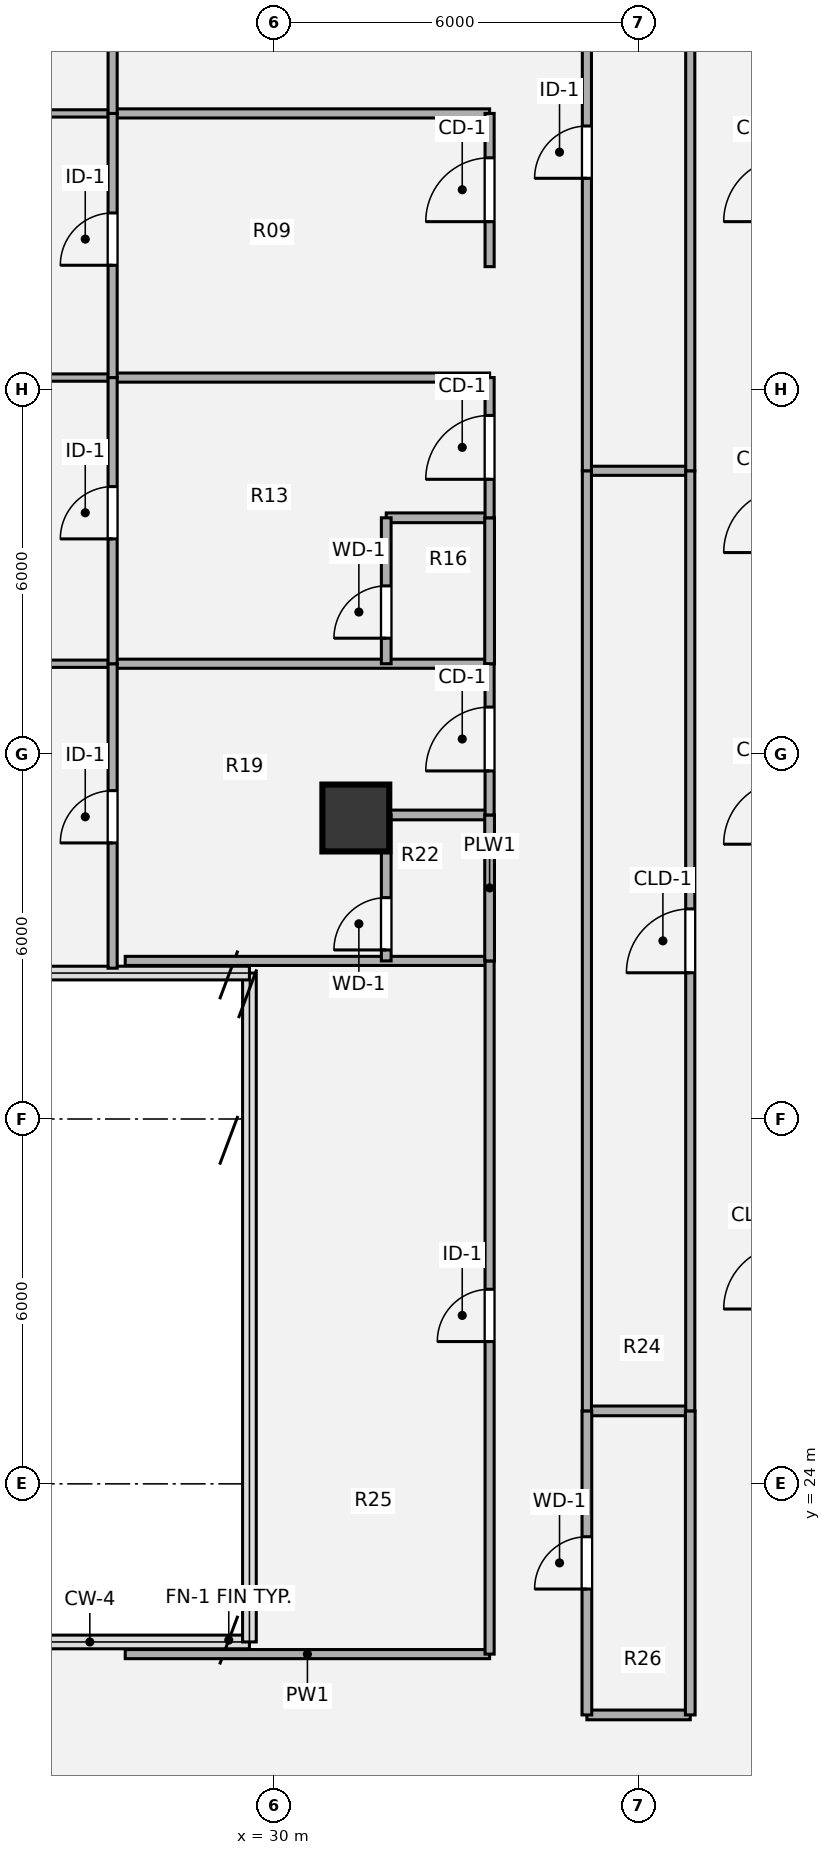
"""IFC4 building model, lengths in metres.
Left out: names, types, materials, properties, quantities, classifications, styles, units other than length and angle.
Written with IfcOpenShell. Run it as: python <this file> out.ifc"""

import sys

from ifc_helpers import new_model, si_unit, direction, frame, frame_2d, origin, origin_2d, place, context, subcontext, project, spatial, rectangle, hollow_circle, extrude, source, transform, mapped, element, fill, save


model = new_model("IFC4")
c1 = context("Model", 3, precision=1e-05, world=origin(), true_north=direction((0.0, 1.0)))
c2 = subcontext(c1, "Body", "Model", "MODEL_VIEW")
j1 = project(units=[si_unit("LENGTHUNIT", "METRE"), si_unit("PLANEANGLEUNIT", "RADIAN")], contexts=[c1])
p1 = place(None, origin())
s1 = spatial("IfcSite", under=j1, at=p1, CompositionType="ELEMENT")
p2 = place(p1, origin())
s2 = spatial("IfcBuilding", under=s1, at=p2, CompositionType="ELEMENT")
p3 = place(p2, frame((0.0, 0.0, 201.78)))
s3 = spatial("IfcBuildingStorey", under=s2, at=p3, CompositionType="ELEMENT", Elevation=201.78)
m1 = source(origin(), c2, "Body", "SweptSolid", [
    extrude(hollow_circle(Radius=0.55, WallThickness=0.04, at=origin_2d()), origin(), (0.0, 0.0, 1.0), 3.78),
])
p4 = place(p3, frame((31.35, 34.95, 0.0), z_axis=(0.0, 0.0, 1.0), x_axis=(1.0, 0.0, 0.0)))
e1 = element("IfcColumn", 1, at=p4, inside=s3, PredefinedType="COLUMN", context=c2, shape_type="MappedRepresentation", body=[
    mapped(m1, transform((0.0, 0.0, 0.0), x_axis=(1.0, 0.0, 0.0), y_axis=(0.0, 1.0, 0.0), z_axis=(0.0, 0.0, 1.0), scale=1.0)),
])
p5 = place(p3, frame((35.15, 20.2, 0.0), z_axis=(0.0, 0.0, 1.0), x_axis=(1.0, 0.0, 0.0)))
e2 = element("IfcWall", 2, at=p5, inside=s3, PredefinedType="PLUMBINGWALL", context=c2, shape_type="SweptSolid", body=[
    extrude(rectangle(XDim=1.7, YDim=0.16, at=frame_2d((0.85, 0.0))), origin(), (0.0, 0.0, 1.0), 3.5),
])
p6 = place(p3, frame((27.558, 21.2, 0.0), z_axis=(0.0, 0.0, 1.0), x_axis=(1.0, 0.0, 0.0)))
e3 = element("IfcWall", 3, at=p6, inside=s3, PredefinedType="PARTITIONING", context=c2, shape_type="SweptSolid", body=[
    extrude(rectangle(XDim=5.992, YDim=0.15, at=frame_2d((2.996, 0.0))), origin(), (0.0, 0.0, 1.0), 3.5),
])
p7 = place(p3, frame((35.15, 25.2, 0.0), z_axis=(0.0, 0.0, 1.0), x_axis=(1.0, 0.0, 0.0)))
e4 = element("IfcWall", 4, at=p7, inside=s3, PredefinedType="PLUMBINGWALL", context=c2, shape_type="SweptSolid", body=[
    extrude(rectangle(XDim=1.7, YDim=0.16, at=frame_2d((0.85, 0.0))), origin(), (0.0, 0.0, 1.0), 3.5),
])
p8 = place(p3, frame((27.557, 32.6, 0.0), z_axis=(0.0, 0.0, 1.0), x_axis=(1.0, 0.0, 0.0)))
e5 = element("IfcWall", 5, at=p8, inside=s3, PredefinedType="PARTITIONING", context=c2, shape_type="SweptSolid", body=[
    extrude(rectangle(XDim=5.993, YDim=0.15, at=frame_2d((2.997, 0.0))), origin(), (0.0, 0.0, 1.0), 3.5),
])
p9 = place(p3, frame((31.85, 35.0, 0.0), z_axis=(0.0, 0.0, 1.0), x_axis=(1.0, 0.0, 0.0)))
e6 = element("IfcWall", 6, at=p9, inside=s3, PredefinedType="PLUMBINGWALL", context=c2, shape_type="SweptSolid", body=[
    extrude(rectangle(XDim=1.7, YDim=0.16, at=frame_2d((0.85, 0.0))), origin(), (0.0, 0.0, 1.0), 2.903),
])
p10 = place(p3, frame((15.88, 37.487, 0.0), z_axis=(0.0, 0.0, 1.0), x_axis=(1.0, 0.0, 0.0)))
e7 = element("IfcWall", 7, at=p10, inside=s3, PredefinedType="PARTITIONING", context=c2, shape_type="SweptSolid", body=[
    extrude(rectangle(XDim=11.47, YDim=0.12, at=frame_2d((5.735, 0.0))), origin(), (0.0, 0.0, 1.0), 3.055),
])
p11 = place(p3, frame((27.35, 37.487, 0.0), z_axis=(0.0, 0.0, 1.0), x_axis=(1.0, 0.0, 0.0)))
e8 = element("IfcWall", 8, at=p11, inside=s3, PredefinedType="PARTITIONING", context=c2, shape_type="SweptSolid", body=[
    extrude(rectangle(XDim=6.2, YDim=0.15, at=frame_2d((3.1, 0.0))), origin(), (0.0, 0.0, 1.0), 3.055),
])
p12 = place(p3, frame((31.85, 39.887, 0.0), z_axis=(0.0, 0.0, 1.0), x_axis=(1.0, 0.0, 0.0)))
e9 = element("IfcWall", 9, at=p12, inside=s3, PredefinedType="PLUMBINGWALL", context=c2, shape_type="SweptSolid", body=[
    extrude(rectangle(XDim=1.7, YDim=0.16, at=frame_2d((0.85, 0.0))), origin(), (0.0, 0.0, 1.0), 3.259),
])
p13 = place(p3, frame((35.15, 40.66, 0.0), z_axis=(0.0, 0.0, 1.0), x_axis=(1.0, 0.0, 0.0)))
e10 = element("IfcWall", 10, at=p13, inside=s3, PredefinedType="PARTITIONING", context=c2, shape_type="SweptSolid", body=[
    extrude(rectangle(XDim=1.7, YDim=0.15, at=frame_2d((0.85, 0.0))), origin(), (0.0, 0.0, 1.0), 3.259),
])
p14 = place(p3, frame((15.88, 42.193, 0.0), z_axis=(0.0, 0.0, 1.0), x_axis=(1.0, 0.0, 0.0)))
e11 = element("IfcWall", 11, at=p14, inside=s3, PredefinedType="PARTITIONING", context=c2, shape_type="SweptSolid", body=[
    extrude(rectangle(XDim=11.47, YDim=0.12, at=frame_2d((5.735, 0.0))), origin(), (0.0, 0.0, 1.0), 2.982),
])
p15 = place(p3, frame((27.35, 42.193, 0.0), z_axis=(0.0, 0.0, 1.0), x_axis=(1.0, 0.0, 0.0)))
e12 = element("IfcWall", 12, at=p15, inside=s3, PredefinedType="PARTITIONING", context=c2, shape_type="SweptSolid", body=[
    extrude(rectangle(XDim=6.2, YDim=0.15, at=frame_2d((3.1, 0.0))), origin(), (0.0, 0.0, 1.0), 2.982),
])
p16 = place(p3, frame((15.88, 46.537, 0.0), z_axis=(0.0, 0.0, 1.0), x_axis=(1.0, 0.0, 0.0)))
e13 = element("IfcWall", 13, at=p16, inside=s3, PredefinedType="PARTITIONING", context=c2, shape_type="SweptSolid", body=[
    extrude(rectangle(XDim=11.47, YDim=0.12, at=frame_2d((5.735, 0.0))), origin(), (0.0, 0.0, 1.0), 3.5),
])
p17 = place(p3, frame((27.35, 46.537, 0.0), z_axis=(0.0, 0.0, 1.0), x_axis=(1.0, 0.0, 0.0)))
e14 = element("IfcWall", 14, at=p17, inside=s3, PredefinedType="PARTITIONING", context=c2, shape_type="SweptSolid", body=[
    extrude(rectangle(XDim=6.2, YDim=0.15, at=frame_2d((3.1, 0.0))), origin(), (0.0, 0.0, 1.0), 3.259),
])
p18 = place(p3, frame((27.35, 32.48, 0.0), z_axis=(0.0, 0.0, 1.0), x_axis=(0.0, 1.0, 0.0)))
e15 = element("IfcWall", 15, at=p18, inside=s3, PredefinedType="PARTITIONING", context=c2, shape_type="SweptSolid", body=[
    extrude(rectangle(XDim=5.007, YDim=0.15, at=frame_2d((2.503, 0.0))), origin(), (0.0, 0.0, 1.0), 3.5),
])
p19 = place(p18, frame((2.06, 0.0, 0.0)))
e16 = element("IfcOpeningElement", 16, at=p19, cuts=e15, PredefinedType="OPENING", context=c2, shape_type="SweptSolid", body=[
    extrude(rectangle(XDim=0.86, YDim=2.1, at=origin_2d()), frame((0.43, 0.085, 1.05), z_axis=(0.0, -1.0, 0.0), x_axis=(1.0, 0.0, 0.0)), (0.0, 0.0, 1.0), 0.17),
])
p20 = place(p3, frame((27.35, 37.487, 0.0), z_axis=(0.0, 0.0, 1.0), x_axis=(0.0, 1.0, 0.0)))
e17 = element("IfcWall", 17, at=p20, inside=s3, PredefinedType="PARTITIONING", context=c2, shape_type="SweptSolid", body=[
    extrude(rectangle(XDim=4.706, YDim=0.15, at=frame_2d((2.353, 0.0))), origin(), (0.0, 0.0, 1.0), 3.5),
])
p21 = place(p20, frame((2.053, 0.0, 0.0)))
e18 = element("IfcOpeningElement", 18, at=p21, cuts=e17, PredefinedType="OPENING", context=c2, shape_type="SweptSolid", body=[
    extrude(rectangle(XDim=0.86, YDim=2.1, at=origin_2d()), frame((0.43, 0.085, 1.05), z_axis=(0.0, -1.0, 0.0), x_axis=(1.0, 0.0, 0.0)), (0.0, 0.0, 1.0), 0.17),
])
p22 = place(p3, frame((27.35, 42.193, 0.0), z_axis=(0.0, 0.0, 1.0), x_axis=(0.0, 1.0, 0.0)))
e19 = element("IfcWall", 19, at=p22, inside=s3, PredefinedType="PARTITIONING", context=c2, shape_type="SweptSolid", body=[
    extrude(rectangle(XDim=4.344, YDim=0.15, at=frame_2d((2.172, 0.0))), origin(), (0.0, 0.0, 1.0), 3.5),
])
p23 = place(p22, frame((1.847, 0.0, 0.0)))
e20 = element("IfcOpeningElement", 20, at=p23, cuts=e19, PredefinedType="OPENING", context=c2, shape_type="SweptSolid", body=[
    extrude(rectangle(XDim=0.86, YDim=2.1, at=origin_2d()), frame((0.43, 0.085, 1.05), z_axis=(0.0, -1.0, 0.0), x_axis=(1.0, 0.0, 0.0)), (0.0, 0.0, 1.0), 0.17),
])
p24 = place(p3, frame((27.35, 46.537, 0.0), z_axis=(0.0, 0.0, 1.0), x_axis=(0.0, 1.0, 0.0)))
e21 = element("IfcWall", 21, at=p24, inside=s3, PredefinedType="PARTITIONING", context=c2, shape_type="SweptSolid", body=[
    extrude(rectangle(XDim=4.163, YDim=0.15, at=frame_2d((2.082, 0.0))), origin(), (0.0, 0.0, 1.0), 3.5),
])
p25 = place(p24, frame((1.503, 0.0, 0.0)))
e22 = element("IfcOpeningElement", 22, at=p25, cuts=e21, PredefinedType="OPENING", context=c2, shape_type="SweptSolid", body=[
    extrude(rectangle(XDim=0.86, YDim=2.1, at=origin_2d()), frame((0.43, 0.085, 1.05), z_axis=(0.0, -1.0, 0.0), x_axis=(1.0, 0.0, 0.0)), (0.0, 0.0, 1.0), 0.17),
])
p26 = place(p3, frame((31.85, 32.6, 0.0), z_axis=(0.0, 0.0, 1.0), x_axis=(0.0, 1.0, 0.0)))
e23 = element("IfcWall", 23, at=p26, inside=s3, PredefinedType="PLUMBINGWALL", context=c2, shape_type="SweptSolid", body=[
    extrude(rectangle(XDim=2.4, YDim=0.16, at=frame_2d((1.2, 0.0))), origin(), (0.0, 0.0, 1.0), 3.5),
])
p27 = place(p26, frame((0.18, 0.0, 0.0)))
e24 = element("IfcOpeningElement", 24, at=p27, cuts=e23, PredefinedType="OPENING", context=c2, shape_type="SweptSolid", body=[
    extrude(rectangle(XDim=0.86, YDim=2.1, at=origin_2d()), frame((0.43, 0.09, 1.05), z_axis=(0.0, -1.0, 0.0), x_axis=(1.0, 0.0, 0.0)), (0.0, 0.0, 1.0), 0.18),
])
p28 = place(p3, frame((31.85, 37.487, 0.0), z_axis=(0.0, 0.0, 1.0), x_axis=(0.0, 1.0, 0.0)))
e25 = element("IfcWall", 25, at=p28, inside=s3, PredefinedType="PLUMBINGWALL", context=c2, shape_type="SweptSolid", body=[
    extrude(rectangle(XDim=2.4, YDim=0.16, at=frame_2d((1.2, 0.0))), origin(), (0.0, 0.0, 1.0), 3.5),
])
p29 = place(p28, frame((0.42, 0.0, 0.0)))
e26 = element("IfcOpeningElement", 26, at=p29, cuts=e25, PredefinedType="OPENING", context=c2, shape_type="SweptSolid", body=[
    extrude(rectangle(XDim=0.86, YDim=2.1, at=origin_2d()), frame((0.43, 0.09, 1.05), z_axis=(0.0, -1.0, 0.0), x_axis=(1.0, 0.0, 0.0)), (0.0, 0.0, 1.0), 0.18),
])
p30 = place(p3, frame((33.55, 21.2, 0.0), z_axis=(0.0, 0.0, 1.0), x_axis=(0.0, 1.0, 0.0)))
e27 = element("IfcWall", 27, at=p30, inside=s3, PredefinedType="PARTITIONING", context=c2, shape_type="SweptSolid", body=[
    extrude(rectangle(XDim=11.4, YDim=0.15, at=frame_2d((5.7, 0.0))), origin(), (0.0, 0.0, 1.0), 3.5),
])
p31 = place(p30, frame((5.14, 0.0, 0.0)))
e28 = element("IfcOpeningElement", 28, at=p31, cuts=e27, PredefinedType="OPENING", context=c2, shape_type="SweptSolid", body=[
    extrude(rectangle(XDim=0.86, YDim=2.1, at=origin_2d()), frame((0.43, 0.085, 1.05), z_axis=(0.0, -1.0, 0.0), x_axis=(1.0, 0.0, 0.0)), (0.0, 0.0, 1.0), 0.17),
])
p32 = place(p3, frame((33.55, 32.6, 0.0), z_axis=(0.0, 0.0, 1.0), x_axis=(0.0, 1.0, 0.0)))
e29 = element("IfcWall", 29, at=p32, inside=s3, PredefinedType="PLUMBINGWALL", context=c2, shape_type="SweptSolid", body=[
    extrude(rectangle(XDim=2.4, YDim=0.16, at=frame_2d((1.2, 0.0))), origin(), (0.0, 0.0, 1.0), 3.5),
])
p33 = place(p3, frame((33.55, 35.0, 0.0), z_axis=(0.0, 0.0, 1.0), x_axis=(0.0, 1.0, 0.0)))
e30 = element("IfcWall", 30, at=p33, inside=s3, PredefinedType="PARTITIONING", context=c2, shape_type="SweptSolid", body=[
    extrude(rectangle(XDim=2.487, YDim=0.15, at=frame_2d((1.244, 0.0))), origin(), (0.0, 0.0, 1.0), 3.5),
])
p34 = place(p33, frame((0.724, 0.0, 0.0)))
e31 = element("IfcOpeningElement", 31, at=p34, cuts=e30, PredefinedType="OPENING", context=c2, shape_type="SweptSolid", body=[
    extrude(rectangle(XDim=1.05, YDim=2.1, at=origin_2d()), frame((0.525, 0.085, 1.05), z_axis=(0.0, -1.0, 0.0), x_axis=(1.0, 0.0, 0.0)), (0.0, 0.0, 1.0), 0.17),
])
p35 = place(p3, frame((33.55, 37.487, 0.0), z_axis=(0.0, 0.0, 1.0), x_axis=(0.0, 1.0, 0.0)))
e32 = element("IfcWall", 32, at=p35, inside=s3, PredefinedType="PLUMBINGWALL", context=c2, shape_type="SweptSolid", body=[
    extrude(rectangle(XDim=2.4, YDim=0.16, at=frame_2d((1.2, 0.0))), origin(), (0.0, 0.0, 1.0), 3.5),
])
p36 = place(p3, frame((33.55, 39.887, 0.0), z_axis=(0.0, 0.0, 1.0), x_axis=(0.0, 1.0, 0.0)))
e33 = element("IfcWall", 33, at=p36, inside=s3, PredefinedType="PARTITIONING", context=c2, shape_type="SweptSolid", body=[
    extrude(rectangle(XDim=2.306, YDim=0.15, at=frame_2d((1.153, 0.0))), origin(), (0.0, 0.0, 1.0), 3.5),
])
p37 = place(p36, frame((0.633, 0.0, 0.0)))
e34 = element("IfcOpeningElement", 34, at=p37, cuts=e33, PredefinedType="OPENING", context=c2, shape_type="SweptSolid", body=[
    extrude(rectangle(XDim=1.05, YDim=2.1, at=origin_2d()), frame((0.525, 0.085, 1.05), z_axis=(0.0, -1.0, 0.0), x_axis=(1.0, 0.0, 0.0)), (0.0, 0.0, 1.0), 0.17),
])
p38 = place(p3, frame((33.55, 44.017, 0.0), z_axis=(0.0, 0.0, 1.0), x_axis=(0.0, 1.0, 0.0)))
e35 = element("IfcWall", 35, at=p38, inside=s3, PredefinedType="PARTITIONING", context=c2, shape_type="SweptSolid", body=[
    extrude(rectangle(XDim=2.52, YDim=0.15, at=frame_2d((1.26, 0.0))), origin(), (0.0, 0.0, 1.0), 3.5),
])
p39 = place(p38, frame((0.74, 0.0, 0.0)))
e36 = element("IfcOpeningElement", 36, at=p39, cuts=e35, PredefinedType="OPENING", context=c2, shape_type="SweptSolid", body=[
    extrude(rectangle(XDim=1.05, YDim=2.1, at=origin_2d()), frame((0.525, 0.085, 1.05), z_axis=(0.0, -1.0, 0.0), x_axis=(1.0, 0.0, 0.0)), (0.0, 0.0, 1.0), 0.17),
])
p40 = place(p3, frame((35.15, 20.2, 0.0), z_axis=(0.0, 0.0, 1.0), x_axis=(0.0, 1.0, 0.0)))
e37 = element("IfcWall", 37, at=p40, inside=s3, PredefinedType="PLUMBINGWALL", context=c2, shape_type="SweptSolid", body=[
    extrude(rectangle(XDim=5.0, YDim=0.16, at=frame_2d((2.5, 0.0))), origin(), (0.0, 0.0, 1.0), 3.5),
])
p41 = place(p40, frame((2.07, 0.0, 0.0)))
e38 = element("IfcOpeningElement", 38, at=p41, cuts=e37, PredefinedType="OPENING", context=c2, shape_type="SweptSolid", body=[
    extrude(rectangle(XDim=0.86, YDim=2.1, at=origin_2d()), frame((0.43, 0.09, 1.05), z_axis=(0.0, -1.0, 0.0), x_axis=(1.0, 0.0, 0.0)), (0.0, 0.0, 1.0), 0.18),
])
p42 = place(p3, frame((35.15, 25.2, 0.0), z_axis=(0.0, 0.0, 1.0), x_axis=(0.0, 1.0, 0.0)))
e39 = element("IfcWall", 39, at=p42, inside=s3, PredefinedType="PARTITIONING", context=c2, shape_type="SweptSolid", body=[
    extrude(rectangle(XDim=15.46, YDim=0.15, at=frame_2d((7.73, 0.0))), origin(), (0.0, 0.0, 1.0), 3.5),
])
p43 = place(p3, frame((35.15, 40.66, 0.0), z_axis=(0.0, 0.0, 1.0), x_axis=(0.0, 1.0, 0.0)))
e40 = element("IfcWall", 40, at=p43, inside=s3, PredefinedType="PARTITIONING", context=c2, shape_type="SweptSolid", body=[
    extrude(rectangle(XDim=10.54, YDim=0.15, at=frame_2d((5.27, 0.0))), origin(), (0.0, 0.0, 1.0), 3.5),
])
p44 = place(p43, frame((4.81, 0.0, 0.0)))
e41 = element("IfcOpeningElement", 41, at=p44, cuts=e40, PredefinedType="OPENING", context=c2, shape_type="SweptSolid", body=[
    extrude(rectangle(XDim=0.86, YDim=2.1, at=origin_2d()), frame((0.43, 0.085, 1.05), z_axis=(0.0, -1.0, 0.0), x_axis=(1.0, 0.0, 0.0)), (0.0, 0.0, 1.0), 0.17),
])
p45 = place(p3, frame((36.85, 20.2, 0.0), z_axis=(0.0, 0.0, 1.0), x_axis=(0.0, 1.0, 0.0)))
e42 = element("IfcWall", 42, at=p45, inside=s3, PredefinedType="PLUMBINGWALL", context=c2, shape_type="SweptSolid", body=[
    extrude(rectangle(XDim=5.0, YDim=0.16, at=frame_2d((2.5, 0.0))), origin(), (0.0, 0.0, 1.0), 3.5),
])
p46 = place(p3, frame((36.85, 25.2, 0.0), z_axis=(0.0, 0.0, 1.0), x_axis=(0.0, 1.0, 0.0)))
e43 = element("IfcWall", 43, at=p46, inside=s3, PredefinedType="PARTITIONING", context=c2, shape_type="SweptSolid", body=[
    extrude(rectangle(XDim=15.46, YDim=0.15, at=frame_2d((7.73, 0.0))), origin(), (0.0, 0.0, 1.0), 3.5),
])
p47 = place(p46, frame((7.205, 0.0, 0.0)))
e44 = element("IfcOpeningElement", 44, at=p47, cuts=e43, PredefinedType="OPENING", context=c2, shape_type="SweptSolid", body=[
    extrude(rectangle(XDim=1.05, YDim=2.1, at=origin_2d()), frame((0.525, 0.085, 1.05), z_axis=(0.0, -1.0, 0.0), x_axis=(1.0, 0.0, 0.0)), (0.0, 0.0, 1.0), 0.17),
])
p48 = place(p3, frame((36.85, 40.66, 0.0), z_axis=(0.0, 0.0, 1.0), x_axis=(0.0, 1.0, 0.0)))
e45 = element("IfcWall", 45, at=p48, inside=s3, PredefinedType="PARTITIONING", context=c2, shape_type="SweptSolid", body=[
    extrude(rectangle(XDim=10.54, YDim=0.15, at=frame_2d((5.27, 0.0))), origin(), (0.0, 0.0, 1.0), 3.5),
])
m2 = source(origin(), c2, "Body", "SweptSolid", [
    extrude(rectangle(XDim=0.86, YDim=2.1, at=origin_2d()), frame((0.43, 0.025, 1.05), z_axis=(0.0, -1.0, 0.0), x_axis=(1.0, 0.0, 0.0)), (0.0, 0.0, 1.0), 0.05),
])
p49 = place(p19, origin())
e46 = element("IfcDoor", 46, at=p49, inside=s3, OperationType="SINGLE_SWING_LEFT", PredefinedType="DOOR", context=c2, shape_type="MappedRepresentation", body=[
    mapped(m2, transform((0.0, 0.0, 0.0), x_axis=(1.0, 0.0, 0.0), y_axis=(0.0, 1.0, 0.0), z_axis=(0.0, 0.0, 1.0), scale=1.0)),
])
fill(e16, e46)
p50 = place(p21, origin())
e47 = element("IfcDoor", 47, at=p50, inside=s3, OperationType="SINGLE_SWING_LEFT", PredefinedType="DOOR", context=c2, shape_type="MappedRepresentation", body=[
    mapped(m2, transform((0.0, 0.0, 0.0), x_axis=(1.0, 0.0, 0.0), y_axis=(0.0, 1.0, 0.0), z_axis=(0.0, 0.0, 1.0), scale=1.0)),
])
fill(e18, e47)
p51 = place(p23, origin())
e48 = element("IfcDoor", 48, at=p51, inside=s3, OperationType="SINGLE_SWING_LEFT", PredefinedType="DOOR", context=c2, shape_type="MappedRepresentation", body=[
    mapped(m2, transform((0.0, 0.0, 0.0), x_axis=(1.0, 0.0, 0.0), y_axis=(0.0, 1.0, 0.0), z_axis=(0.0, 0.0, 1.0), scale=1.0)),
])
fill(e20, e48)
m3 = source(origin(), c2, "Body", "SweptSolid", [
    extrude(rectangle(XDim=0.86, YDim=2.1, at=origin_2d()), frame((0.43, 0.025, 1.05), z_axis=(0.0, -1.0, 0.0), x_axis=(1.0, 0.0, 0.0)), (0.0, 0.0, 1.0), 0.05),
])
p52 = place(p27, origin())
e49 = element("IfcDoor", 49, at=p52, inside=s3, OperationType="SINGLE_SWING_LEFT", PredefinedType="DOOR", context=c2, shape_type="MappedRepresentation", body=[
    mapped(m3, transform((0.0, 0.0, 0.0), x_axis=(1.0, 0.0, 0.0), y_axis=(0.0, 1.0, 0.0), z_axis=(0.0, 0.0, 1.0), scale=1.0)),
])
fill(e24, e49)
p53 = place(p29, origin())
e50 = element("IfcDoor", 50, at=p53, inside=s3, OperationType="SINGLE_SWING_LEFT", PredefinedType="DOOR", context=c2, shape_type="MappedRepresentation", body=[
    mapped(m3, transform((0.0, 0.0, 0.0), x_axis=(1.0, 0.0, 0.0), y_axis=(0.0, 1.0, 0.0), z_axis=(0.0, 0.0, 1.0), scale=1.0)),
])
fill(e26, e50)
p54 = place(p31, origin())
e51 = element("IfcDoor", 51, at=p54, inside=s3, OperationType="SINGLE_SWING_LEFT", PredefinedType="DOOR", context=c2, shape_type="MappedRepresentation", body=[
    mapped(m2, transform((0.0, 0.0, 0.0), x_axis=(1.0, 0.0, 0.0), y_axis=(0.0, 1.0, 0.0), z_axis=(0.0, 0.0, 1.0), scale=1.0)),
])
fill(e28, e51)
m4 = source(origin(), c2, "Body", "SweptSolid", [
    extrude(rectangle(XDim=1.05, YDim=2.1, at=origin_2d()), frame((0.525, 0.025, 1.05), z_axis=(0.0, -1.0, 0.0), x_axis=(1.0, 0.0, 0.0)), (0.0, 0.0, 1.0), 0.05),
])
p55 = place(p34, origin())
e52 = element("IfcDoor", 52, at=p55, inside=s3, OperationType="SINGLE_SWING_LEFT", PredefinedType="DOOR", context=c2, shape_type="MappedRepresentation", body=[
    mapped(m4, transform((0.0, 0.0, 0.0), x_axis=(1.0, 0.0, 0.0), y_axis=(0.0, 1.0, 0.0), z_axis=(0.0, 0.0, 1.0), scale=1.0)),
])
fill(e31, e52)
p56 = place(p37, origin())
e53 = element("IfcDoor", 53, at=p56, inside=s3, OperationType="SINGLE_SWING_LEFT", PredefinedType="DOOR", context=c2, shape_type="MappedRepresentation", body=[
    mapped(m4, transform((0.0, 0.0, 0.0), x_axis=(1.0, 0.0, 0.0), y_axis=(0.0, 1.0, 0.0), z_axis=(0.0, 0.0, 1.0), scale=1.0)),
])
fill(e34, e53)
p57 = place(p39, origin())
e54 = element("IfcDoor", 54, at=p57, inside=s3, OperationType="SINGLE_SWING_LEFT", PredefinedType="DOOR", context=c2, shape_type="MappedRepresentation", body=[
    mapped(m4, transform((0.0, 0.0, 0.0), x_axis=(1.0, 0.0, 0.0), y_axis=(0.0, 1.0, 0.0), z_axis=(0.0, 0.0, 1.0), scale=1.0)),
])
fill(e36, e54)
p58 = place(p41, origin())
e55 = element("IfcDoor", 55, at=p58, inside=s3, OperationType="SINGLE_SWING_LEFT", PredefinedType="DOOR", context=c2, shape_type="MappedRepresentation", body=[
    mapped(m3, transform((0.0, 0.0, 0.0), x_axis=(1.0, 0.0, 0.0), y_axis=(0.0, 1.0, 0.0), z_axis=(0.0, 0.0, 1.0), scale=1.0)),
])
fill(e38, e55)
p59 = place(p44, origin())
e56 = element("IfcDoor", 56, at=p59, inside=s3, OperationType="SINGLE_SWING_LEFT", PredefinedType="DOOR", context=c2, shape_type="MappedRepresentation", body=[
    mapped(m2, transform((0.0, 0.0, 0.0), x_axis=(1.0, 0.0, 0.0), y_axis=(0.0, 1.0, 0.0), z_axis=(0.0, 0.0, 1.0), scale=1.0)),
])
fill(e41, e56)
m5 = source(origin(), c2, "Body", "SweptSolid", [
    extrude(rectangle(XDim=1.05, YDim=2.1, at=origin_2d()), frame((0.525, 0.025, 1.05), z_axis=(0.0, -1.0, 0.0), x_axis=(1.0, 0.0, 0.0)), (0.0, 0.0, 1.0), 0.05),
])
p60 = place(p47, origin())
e57 = element("IfcDoor", 57, at=p60, inside=s3, OperationType="SINGLE_SWING_LEFT", PredefinedType="DOOR", context=c2, shape_type="MappedRepresentation", body=[
    mapped(m5, transform((0.0, 0.0, 0.0), x_axis=(1.0, 0.0, 0.0), y_axis=(0.0, 1.0, 0.0), z_axis=(0.0, 0.0, 1.0), scale=1.0)),
])
fill(e44, e57)
save(model, sys.argv[1])
